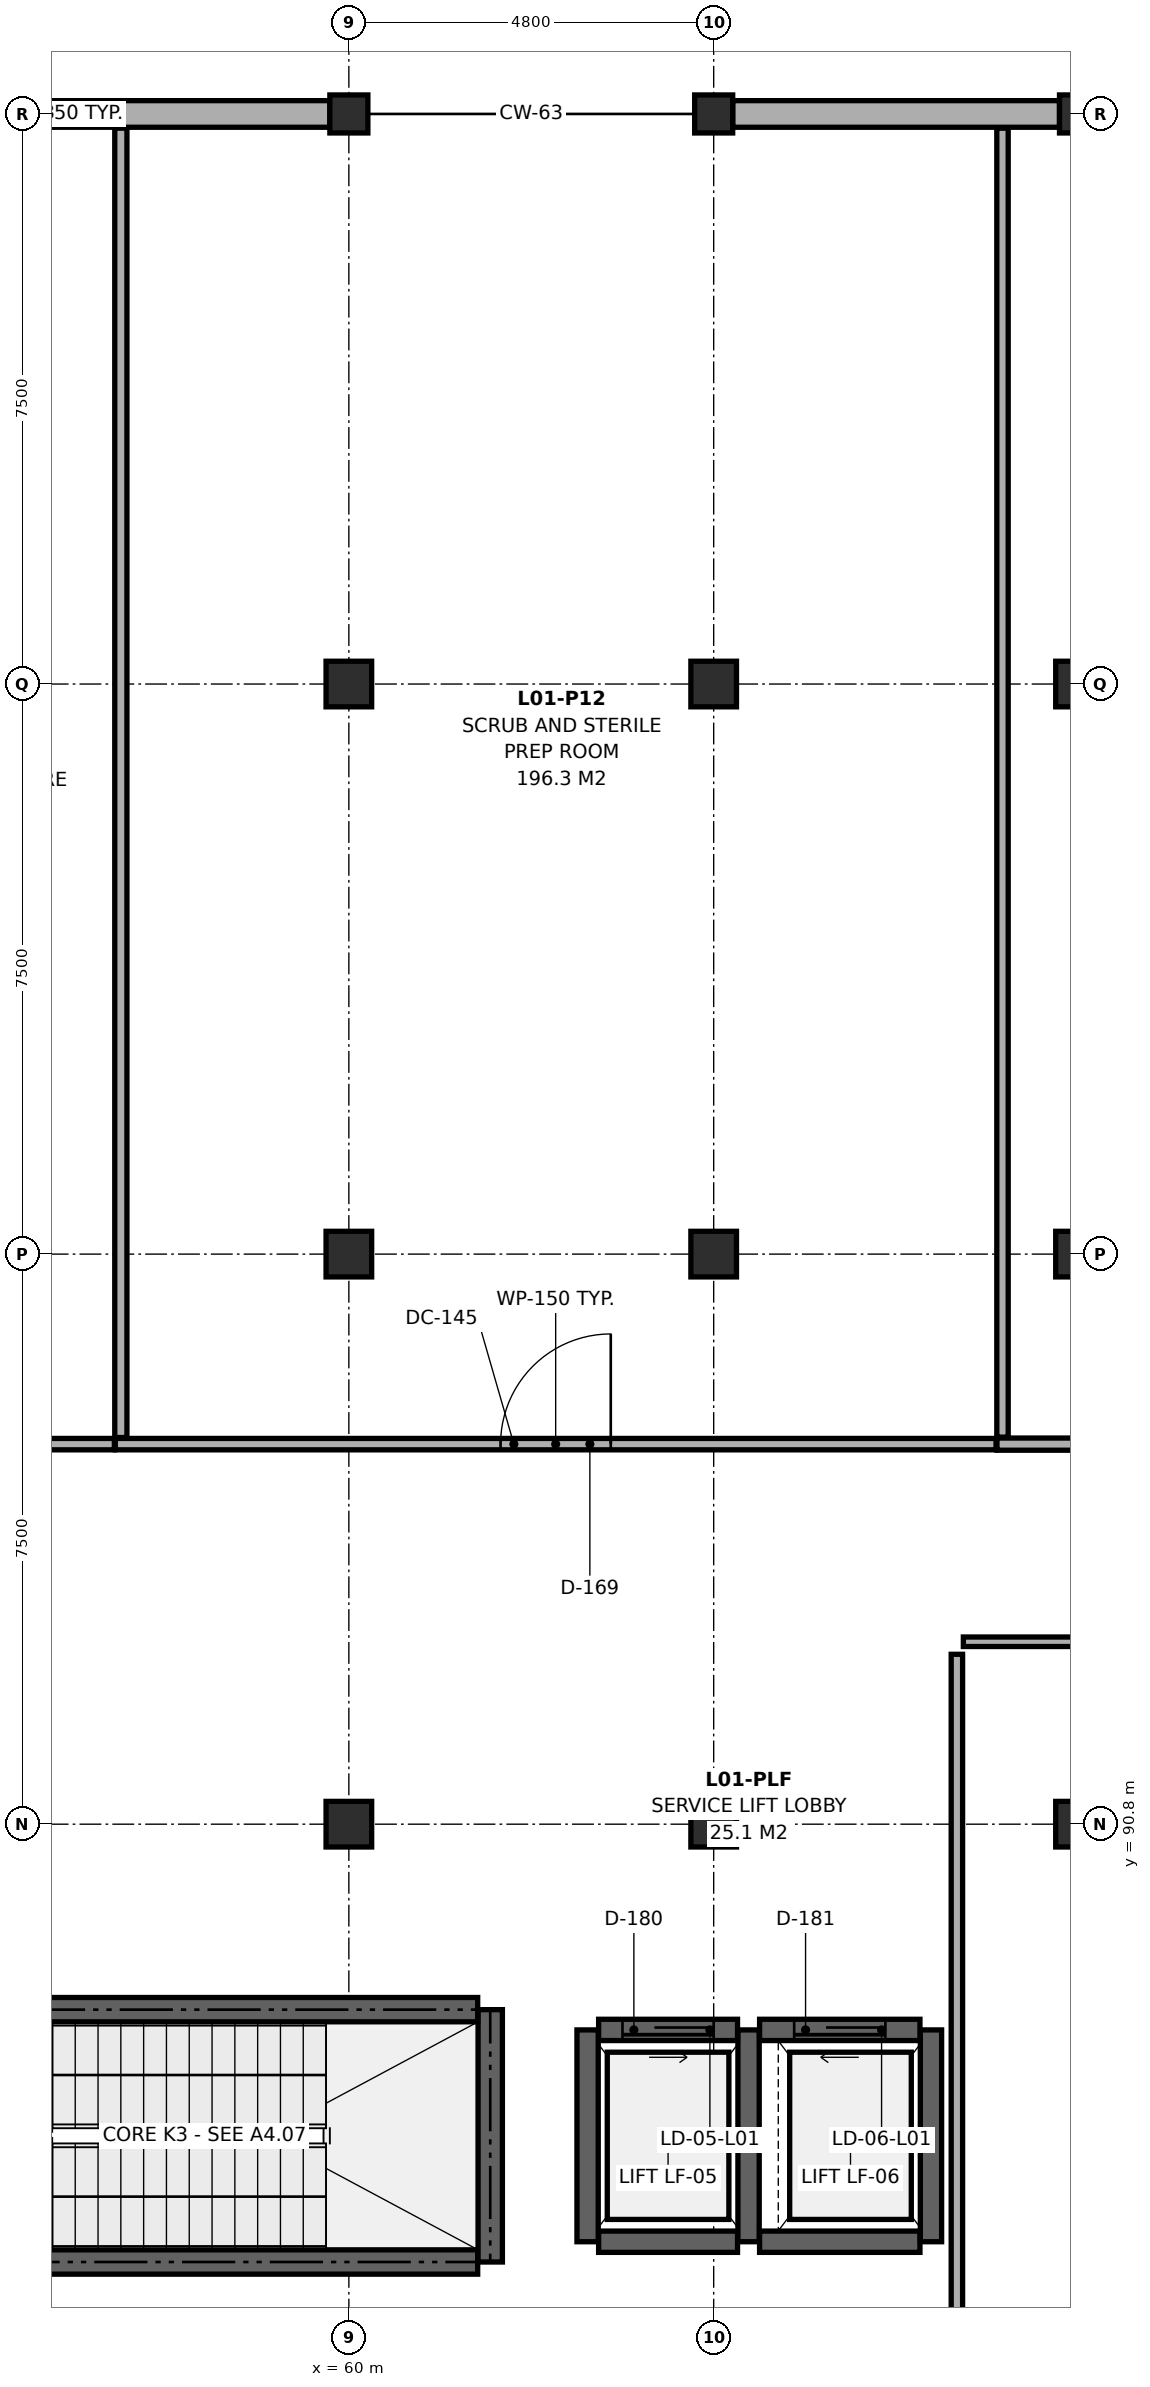
"""IFC4 building model, lengths in metres.
Left out: names, types, materials, properties, quantities, classifications, styles, units other than length and angle.
Written with IfcOpenShell. Run it as: python <this file> out.ifc"""

import sys

from ifc_helpers import new_model, si_unit, direction, frame, frame_2d, origin, origin_2d, place, context, subcontext, project, spatial, rectangle, extrude, element, fill, save


model = new_model("IFC4")
c1 = context("Model", 3, precision=1e-05, world=origin(), true_north=direction((0.0, 1.0)))
c2 = subcontext(c1, "Body", "Model", "MODEL_VIEW")
j1 = project(units=[si_unit("LENGTHUNIT", "METRE"), si_unit("PLANEANGLEUNIT", "RADIAN")], contexts=[c1])
p1 = place(None, origin())
s1 = spatial("IfcSite", under=j1, at=p1, CompositionType="ELEMENT")
p2 = place(p1, origin())
s2 = spatial("IfcBuilding", under=s1, at=p2, CompositionType="ELEMENT")
p3 = place(p2, frame((0.0, 0.0, 5.0)))
s3 = spatial("IfcBuildingStorey", under=s2, at=p3, CompositionType="ELEMENT", Elevation=5.0)
for number, where, z_axis, x_axis in (
    (1, (60.0, 90.8, 0.0), (0.0, 0.0, 1.0), (1.0, 0.0, 0.0)),
    (2, (60.0, 98.3, 0.0), (0.0, 0.0, 1.0), (1.0, 0.0, 0.0)),
    (3, (60.0, 105.8, 0.0), (0.0, 0.0, 1.0), (1.0, 0.0, 0.0)),
):
    element("IfcColumn", number, at=place(p3, frame(where, z_axis=z_axis, x_axis=x_axis)), inside=s3, PredefinedType="COLUMN", context=c2, shape_type="SweptSolid", body=[
        extrude(rectangle(XDim=0.6, YDim=0.6, at=origin_2d()), origin(), (0.0, 0.0, 1.0), 4.2),
    ])
p4 = place(p3, frame((60.0, 113.3, 0.0), z_axis=(0.0, 0.0, 1.0), x_axis=(1.0, 0.0, 0.0)))
e4 = element("IfcColumn", 4, at=p4, inside=s3, PredefinedType="COLUMN", context=c2, shape_type="SweptSolid", body=[
    extrude(rectangle(XDim=0.5, YDim=0.5, at=origin_2d()), origin(), (0.0, 0.0, 1.0), 5.636),
])
for number, where, z_axis, x_axis in (
    (5, (64.8, 90.8, 0.0), (0.0, 0.0, 1.0), (1.0, 0.0, 0.0)),
    (6, (64.8, 98.3, 0.0), (0.0, 0.0, 1.0), (1.0, 0.0, 0.0)),
    (7, (64.8, 105.8, 0.0), (0.0, 0.0, 1.0), (1.0, 0.0, 0.0)),
):
    element("IfcColumn", number, at=place(p3, frame(where, z_axis=z_axis, x_axis=x_axis)), inside=s3, PredefinedType="COLUMN", context=c2, shape_type="SweptSolid", body=[
        extrude(rectangle(XDim=0.6, YDim=0.6, at=origin_2d()), origin(), (0.0, 0.0, 1.0), 4.2),
    ])
p5 = place(p3, frame((64.8, 113.3, 0.0), z_axis=(0.0, 0.0, 1.0), x_axis=(1.0, 0.0, 0.0)))
e8 = element("IfcColumn", 8, at=p5, inside=s3, PredefinedType="COLUMN", context=c2, shape_type="SweptSolid", body=[
    extrude(rectangle(XDim=0.5, YDim=0.5, at=origin_2d()), origin(), (0.0, 0.0, 1.0), 5.636),
])
for number, where, z_axis, x_axis in (
    (9, (69.6, 90.8, 0.0), (0.0, 0.0, 1.0), (1.0, 0.0, 0.0)),
    (10, (69.6, 98.3, 0.0), (0.0, 0.0, 1.0), (1.0, 0.0, 0.0)),
    (11, (69.6, 105.8, 0.0), (0.0, 0.0, 1.0), (1.0, 0.0, 0.0)),
):
    element("IfcColumn", number, at=place(p3, frame(where, z_axis=z_axis, x_axis=x_axis)), inside=s3, PredefinedType="COLUMN", context=c2, shape_type="SweptSolid", body=[
        extrude(rectangle(XDim=0.6, YDim=0.6, at=origin_2d()), origin(), (0.0, 0.0, 1.0), 4.2),
    ])
p6 = place(p3, frame((69.6, 113.3, 0.0), z_axis=(0.0, 0.0, 1.0), x_axis=(1.0, 0.0, 0.0)))
e12 = element("IfcColumn", 12, at=p6, inside=s3, PredefinedType="COLUMN", context=c2, shape_type="SweptSolid", body=[
    extrude(rectangle(XDim=0.5, YDim=0.5, at=origin_2d()), origin(), (0.0, 0.0, 1.0), 5.636),
])
p7 = place(p3, frame((52.75, 113.3, 0.0), z_axis=(0.0, 0.0, 1.0), x_axis=(1.0, 0.0, 0.0)))
e13 = element("IfcWall", 13, at=p7, inside=s3, PredefinedType="SOLIDWALL", context=c2, shape_type="SweptSolid", body=[
    extrude(rectangle(XDim=7.0, YDim=0.35, at=frame_2d((3.5, 0.0))), origin(), (0.0, 0.0, 1.0), 4.17),
])
p8 = place(p3, frame((65.05, 113.3, 0.0), z_axis=(0.0, 0.0, 1.0), x_axis=(1.0, 0.0, 0.0)))
e14 = element("IfcWall", 14, at=p8, inside=s3, PredefinedType="SOLIDWALL", context=c2, shape_type="SweptSolid", body=[
    extrude(rectangle(XDim=4.3, YDim=0.35, at=frame_2d((2.15, 0.0))), origin(), (0.0, 0.0, 1.0), 4.17),
])
p9 = place(p3, frame((54.505, 85.04, 0.0), z_axis=(0.0, 0.0, 1.0), x_axis=(1.0, 0.0, 0.0)))
e15 = element("IfcWall", 15, at=p9, inside=s3, PredefinedType="SHEAR", context=c2, shape_type="SweptSolid", body=[
    extrude(rectangle(XDim=7.19, YDim=0.32, at=frame_2d((3.595, 0.0))), origin(), (0.0, 0.0, 1.0), 4.2),
])
p10 = place(p3, frame((61.86, 85.04, 0.0), z_axis=(0.0, 0.0, 1.0), x_axis=(0.0, 1.0, 0.0)))
e16 = element("IfcWall", 16, at=p10, inside=s3, PredefinedType="SHEAR", context=c2, shape_type="SweptSolid", body=[
    extrude(rectangle(XDim=3.32, YDim=0.32, at=frame_2d((1.66, 0.0))), origin(), (0.0, 0.0, 1.0), 4.2),
])
p11 = place(p3, frame((61.695, 88.36, 0.0), z_axis=(0.0, 0.0, 1.0), x_axis=(-1.0, 0.0, 0.0)))
e17 = element("IfcWall", 17, at=p11, inside=s3, PredefinedType="SHEAR", context=c2, shape_type="SweptSolid", body=[
    extrude(rectangle(XDim=7.19, YDim=0.32, at=frame_2d((3.595, 0.0))), origin(), (0.0, 0.0, 1.0), 4.2),
])
p12 = place(p3, frame((63.286, 85.307, 0.0), z_axis=(0.0, 0.0, 1.0), x_axis=(1.0, 0.0, 0.0)))
e18 = element("IfcWall", 18, at=p12, inside=s3, PredefinedType="SHEAR", context=c2, shape_type="SweptSolid", body=[
    extrude(rectangle(XDim=1.828, YDim=0.28, at=frame_2d((0.914, 0.0))), origin(), (0.0, 0.0, 1.0), 4.2),
])
p13 = place(p3, frame((65.259, 85.307, 0.0), z_axis=(0.0, 0.0, 1.0), x_axis=(0.0, 1.0, 0.0)))
e19 = element("IfcWall", 19, at=p13, inside=s3, PredefinedType="SHEAR", context=c2, shape_type="SweptSolid", body=[
    extrude(rectangle(XDim=2.787, YDim=0.28, at=frame_2d((1.393, 0.0))), origin(), (0.0, 0.0, 1.0), 4.2),
])
p14 = place(p3, frame((65.114, 88.093, 0.0), z_axis=(0.0, 0.0, 1.0), x_axis=(-1.0, 0.0, 0.0)))
e20 = element("IfcWall", 20, at=p14, inside=s3, PredefinedType="SHEAR", context=c2, shape_type="SweptSolid", body=[
    extrude(rectangle(XDim=1.828, YDim=0.28, at=frame_2d((0.914, 0.0))), origin(), (0.0, 0.0, 1.0), 4.2),
])
p15 = place(p14, frame((0.314, 0.0, 0.0)))
e21 = element("IfcOpeningElement", 21, at=p15, cuts=e20, PredefinedType="OPENING", context=c2, shape_type="SweptSolid", body=[
    extrude(rectangle(XDim=1.2, YDim=2.15, at=frame_2d((0.6, 1.075))), frame((0.0, 0.152, 0.0), z_axis=(0.0, -1.0, 0.0), x_axis=(1.0, 0.0, 0.0)), (0.0, 0.0, 1.0), 0.304),
])
p16 = place(p3, frame((63.141, 88.093, 0.0), z_axis=(0.0, 0.0, 1.0), x_axis=(0.0, -1.0, 0.0)))
e22 = element("IfcWall", 22, at=p16, inside=s3, PredefinedType="SHEAR", context=c2, shape_type="SweptSolid", body=[
    extrude(rectangle(XDim=2.787, YDim=0.28, at=frame_2d((1.393, 0.0))), origin(), (0.0, 0.0, 1.0), 4.2),
])
p17 = place(p3, frame((65.404, 85.307, 0.0), z_axis=(0.0, 0.0, 1.0), x_axis=(1.0, 0.0, 0.0)))
e23 = element("IfcWall", 23, at=p17, inside=s3, PredefinedType="SHEAR", context=c2, shape_type="SweptSolid", body=[
    extrude(rectangle(XDim=2.11, YDim=0.28, at=frame_2d((1.055, 0.0))), origin(), (0.0, 0.0, 1.0), 4.2),
])
p18 = place(p3, frame((67.659, 85.307, 0.0), z_axis=(0.0, 0.0, 1.0), x_axis=(0.0, 1.0, 0.0)))
e24 = element("IfcWall", 24, at=p18, inside=s3, PredefinedType="SHEAR", context=c2, shape_type="SweptSolid", body=[
    extrude(rectangle(XDim=2.787, YDim=0.28, at=frame_2d((1.393, 0.0))), origin(), (0.0, 0.0, 1.0), 4.2),
])
p19 = place(p3, frame((67.514, 88.093, 0.0), z_axis=(0.0, 0.0, 1.0), x_axis=(-1.0, 0.0, 0.0)))
e25 = element("IfcWall", 25, at=p19, inside=s3, PredefinedType="SHEAR", context=c2, shape_type="SweptSolid", body=[
    extrude(rectangle(XDim=2.11, YDim=0.28, at=frame_2d((1.055, 0.0))), origin(), (0.0, 0.0, 1.0), 4.2),
])
p20 = place(p19, frame((0.455, 0.0, 0.0)))
e26 = element("IfcOpeningElement", 26, at=p20, cuts=e25, PredefinedType="OPENING", context=c2, shape_type="SweptSolid", body=[
    extrude(rectangle(XDim=1.2, YDim=2.15, at=frame_2d((0.6, 1.075))), frame((0.0, 0.152, 0.0), z_axis=(0.0, -1.0, 0.0), x_axis=(1.0, 0.0, 0.0)), (0.0, 0.0, 1.0), 0.304),
])
p21 = place(p3, frame((45.187, 95.8, 0.0), z_axis=(0.0, 0.0, 1.0), x_axis=(1.0, 0.0, 0.0)))
e27 = element("IfcWall", 27, at=p21, inside=s3, PredefinedType="PARTITIONING", context=c2, shape_type="SweptSolid", body=[
    extrude(rectangle(XDim=11.728, YDim=0.15, at=frame_2d((5.864, 0.0))), origin(), (0.0, 0.0, 1.0), 3.485),
])
p22 = place(p21, frame((5.164, 0.0, 0.0)))
e28 = element("IfcOpeningElement", 28, at=p22, cuts=e27, PredefinedType="OPENING", context=c2, shape_type="SweptSolid", body=[
    extrude(rectangle(XDim=1.4, YDim=2.25, at=frame_2d((0.7, 1.125))), frame((0.0, 0.087, 0.0), z_axis=(0.0, -1.0, 0.0), x_axis=(1.0, 0.0, 0.0)), (0.0, 0.0, 1.0), 0.174),
])
p23 = place(p3, frame((56.927, 95.8, 0.0), z_axis=(0.0, 0.0, 1.0), x_axis=(1.0, 0.0, 0.0)))
e29 = element("IfcWall", 29, at=p23, inside=s3, PredefinedType="PARTITIONING", context=c2, shape_type="SweptSolid", body=[
    extrude(rectangle(XDim=11.588, YDim=0.15, at=frame_2d((5.794, 0.0))), origin(), (0.0, 0.0, 1.0), 3.485),
])
p24 = place(p23, frame((5.069, 0.0, 0.0)))
e30 = element("IfcOpeningElement", 30, at=p24, cuts=e29, PredefinedType="OPENING", context=c2, shape_type="SweptSolid", body=[
    extrude(rectangle(XDim=1.45, YDim=2.26, at=frame_2d((0.725, 1.13))), frame((0.0, 0.087, 0.0), z_axis=(0.0, -1.0, 0.0), x_axis=(1.0, 0.0, 0.0)), (0.0, 0.0, 1.0), 0.174),
])
p25 = place(p3, frame((68.527, 95.8, 0.0), z_axis=(0.0, 0.0, 1.0), x_axis=(1.0, 0.0, 0.0)))
e31 = element("IfcWall", 31, at=p25, inside=s3, PredefinedType="PARTITIONING", context=c2, shape_type="SweptSolid", body=[
    extrude(rectangle(XDim=11.588, YDim=0.16, at=frame_2d((5.794, 0.0))), origin(), (0.0, 0.0, 1.0), 3.485),
])
p26 = place(p25, frame((5.952, 0.0, 0.0)))
e32 = element("IfcOpeningElement", 32, at=p26, cuts=e31, PredefinedType="OPENING", context=c2, shape_type="SweptSolid", body=[
    extrude(rectangle(XDim=1.5, YDim=2.28, at=frame_2d((0.75, 1.14))), frame((0.0, 0.092, 0.0), z_axis=(0.0, -1.0, 0.0), x_axis=(1.0, 0.0, 0.0)), (0.0, 0.0, 1.0), 0.184),
])
p27 = place(p3, frame((68.085, 93.2, 0.0), z_axis=(0.0, 0.0, 1.0), x_axis=(1.0, 0.0, 0.0)))
e33 = element("IfcWall", 33, at=p27, inside=s3, PredefinedType="PARTITIONING", context=c2, shape_type="SweptSolid", body=[
    extrude(rectangle(XDim=7.03, YDim=0.125, at=frame_2d((3.515, 0.0))), origin(), (0.0, 0.0, 1.0), 3.485),
])
p28 = place(p27, frame((2.825, 0.0, 0.0)))
e34 = element("IfcOpeningElement", 34, at=p28, cuts=e33, PredefinedType="OPENING", context=c2, shape_type="SweptSolid", body=[
    extrude(rectangle(XDim=1.38, YDim=2.3, at=frame_2d((0.69, 1.15))), frame((0.0, 0.074, 0.0), z_axis=(0.0, -1.0, 0.0), x_axis=(1.0, 0.0, 0.0)), (0.0, 0.0, 1.0), 0.149),
])
p29 = place(p3, frame((57.0, 95.887, 0.0), z_axis=(0.0, 0.0, 1.0), x_axis=(0.0, 1.0, 0.0)))
e35 = element("IfcWall", 35, at=p29, inside=s3, PredefinedType="PARTITIONING", context=c2, shape_type="SweptSolid", body=[
    extrude(rectangle(XDim=17.226, YDim=0.16, at=frame_2d((8.613, 0.0))), origin(), (0.0, 0.0, 1.0), 3.485),
])
p30 = place(p3, frame((68.6, 95.892, 0.0), z_axis=(0.0, 0.0, 1.0), x_axis=(0.0, 1.0, 0.0)))
e36 = element("IfcWall", 36, at=p30, inside=s3, PredefinedType="PARTITIONING", context=c2, shape_type="SweptSolid", body=[
    extrude(rectangle(XDim=17.221, YDim=0.15, at=frame_2d((8.61, 0.0))), origin(), (0.0, 0.0, 1.0), 3.535),
])
p31 = place(p3, frame((68.0, 83.402, 0.0), z_axis=(0.0, 0.0, 1.0), x_axis=(0.0, 1.0, 0.0)))
e37 = element("IfcWall", 37, at=p31, inside=s3, PredefinedType="PARTITIONING", context=c2, shape_type="SweptSolid", body=[
    extrude(rectangle(XDim=9.633, YDim=0.15, at=frame_2d((4.816, 0.0))), origin(), (0.0, 0.0, 1.0), 3.535),
])
p32 = place(p15, origin())
e38 = element("IfcDoor", 38, at=p32, inside=s3, OperationType="SLIDING_TO_LEFT", PredefinedType="DOOR", context=c2, shape_type="SweptSolid", body=[
    extrude(rectangle(XDim=1.2, YDim=2.15, at=frame_2d((0.6, 1.075))), frame((0.0, 0.025, 0.0), z_axis=(0.0, -1.0, 0.0), x_axis=(1.0, 0.0, 0.0)), (0.0, 0.0, 1.0), 0.05),
])
fill(e21, e38)
p33 = place(p20, origin())
e39 = element("IfcDoor", 39, at=p33, inside=s3, OperationType="SLIDING_TO_RIGHT", PredefinedType="DOOR", context=c2, shape_type="SweptSolid", body=[
    extrude(rectangle(XDim=1.2, YDim=2.15, at=frame_2d((0.6, 1.075))), frame((0.0, 0.025, 0.0), z_axis=(0.0, -1.0, 0.0), x_axis=(1.0, 0.0, 0.0)), (0.0, 0.0, 1.0), 0.05),
])
fill(e26, e39)
p34 = place(p24, origin())
e40 = element("IfcDoor", 40, at=p34, inside=s3, OperationType="SINGLE_SWING_RIGHT", PredefinedType="DOOR", context=c2, shape_type="SweptSolid", body=[
    extrude(rectangle(XDim=1.45, YDim=2.26, at=frame_2d((0.725, 1.13))), frame((0.0, 0.025, 0.0), z_axis=(0.0, -1.0, 0.0), x_axis=(1.0, 0.0, 0.0)), (0.0, 0.0, 1.0), 0.05),
])
fill(e30, e40)
save(model, sys.argv[1])
